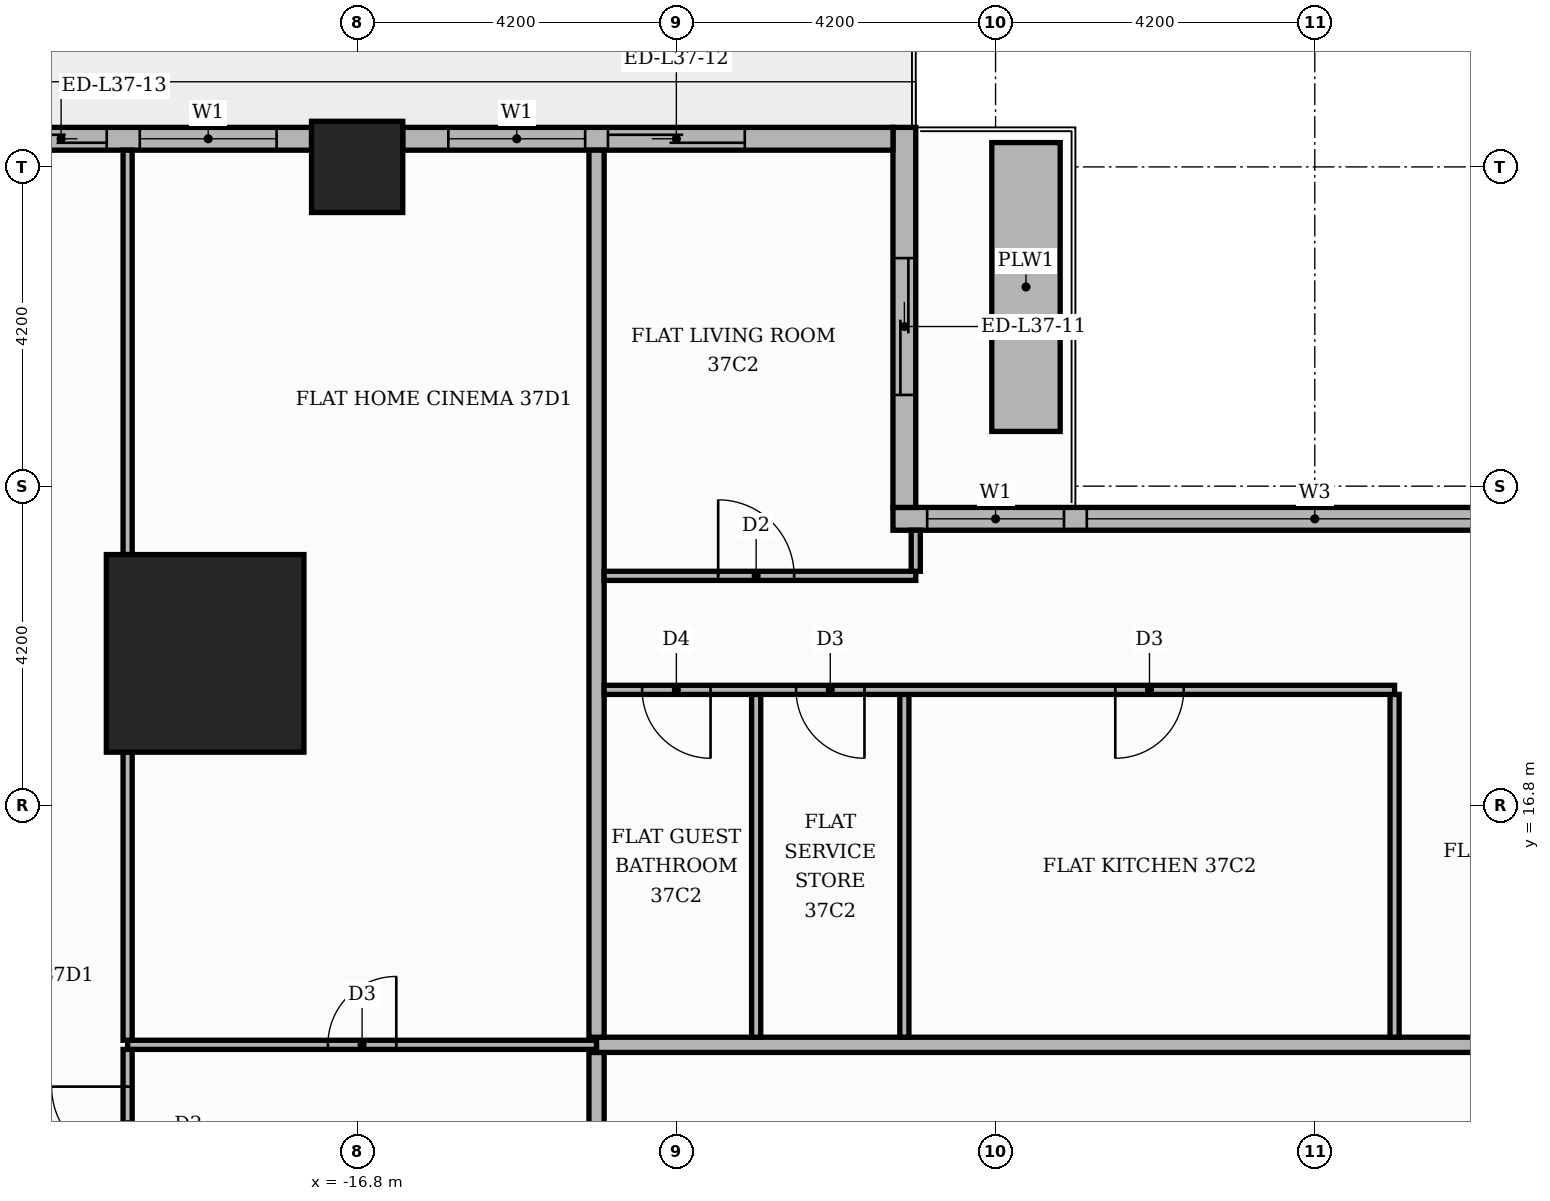
"""IFC4 building model, lengths in metres.
Left out: names, types, materials, properties, quantities, classifications, styles, units other than length and angle.
Written with IfcOpenShell. Run it as: python <this file> out.ifc"""

import sys

from ifc_helpers import new_model, si_unit, direction, frame, frame_2d, origin, origin_2d, place, context, subcontext, project, spatial, rectangle, extrude, element, fill, save


model = new_model("IFC4")
c1 = context("Model", 3, precision=1e-05, world=origin(), true_north=direction((0.0, 1.0)))
c2 = subcontext(c1, "Body", "Model", "MODEL_VIEW")
j1 = project(units=[si_unit("LENGTHUNIT", "METRE"), si_unit("PLANEANGLEUNIT", "RADIAN")], contexts=[c1])
p1 = place(None, origin())
s1 = spatial("IfcSite", under=j1, at=p1, CompositionType="ELEMENT")
p2 = place(p1, origin())
s2 = spatial("IfcBuilding", under=s1, at=p2, CompositionType="ELEMENT")
p3 = place(p2, frame((0.0, 0.0, 157.2)))
s3 = spatial("IfcBuildingStorey", under=s2, at=p3, CompositionType="ELEMENT", Elevation=157.2)
p4 = place(p3, frame((-18.8, 18.8, 0.0), z_axis=(0.0, 0.0, 1.0), x_axis=(1.0, 0.0, 0.0)))
e1 = element("IfcColumn", 1, at=p4, inside=s3, PredefinedType="COLUMN", context=c2, shape_type="SweptSolid", body=[
    extrude(rectangle(XDim=2.6, YDim=2.6, at=origin_2d()), origin(), (0.0, 0.0, 1.0), 3.9),
])
p5 = place(p3, frame((-16.8, 25.2, 0.0), z_axis=(0.0, 0.0, 1.0), x_axis=(1.0, 0.0, 0.0)))
e2 = element("IfcColumn", 2, at=p5, inside=s3, PredefinedType="COLUMN", context=c2, shape_type="SweptSolid", body=[
    extrude(rectangle(XDim=1.2, YDim=1.2, at=origin_2d()), origin(), (0.0, 0.0, 1.0), 3.9),
])
p6 = place(p3, frame((9.45, 20.57, 0.0), z_axis=(0.0, 0.0, 1.0), x_axis=(-1.0, 0.0, 0.0)))
e3 = element("IfcWall", 3, at=p6, inside=s3, PredefinedType="STANDARD", context=c2, shape_type="SweptSolid", body=[
    extrude(rectangle(XDim=19.2, YDim=0.3, at=frame_2d((9.6, 0.0))), origin(), (0.0, 0.0, 1.0), 3.48),
])
p7 = place(p6, frame((0.15, 0.0, 0.9)))
e4 = element("IfcOpeningElement", 4, at=p7, cuts=e3, PredefinedType="OPENING", context=c2, shape_type="SweptSolid", body=[
    extrude(rectangle(XDim=3.9, YDim=2.1, at=frame_2d((1.95, 1.05))), frame((0.0, 0.16, 0.0), z_axis=(0.0, -1.0, 0.0), x_axis=(1.0, 0.0, 0.0)), (0.0, 0.0, 1.0), 0.32),
])
p8 = place(p6, frame((4.35, 0.0, 0.9)))
e5 = element("IfcOpeningElement", 5, at=p8, cuts=e3, PredefinedType="OPENING", context=c2, shape_type="SweptSolid", body=[
    extrude(rectangle(XDim=6.0, YDim=2.1, at=frame_2d((3.0, 1.05))), frame((0.0, 0.16, 0.0), z_axis=(0.0, -1.0, 0.0), x_axis=(1.0, 0.0, 0.0)), (0.0, 0.0, 1.0), 0.32),
])
p9 = place(p6, frame((10.65, 0.0, 0.9)))
e6 = element("IfcOpeningElement", 6, at=p9, cuts=e3, PredefinedType="OPENING", context=c2, shape_type="SweptSolid", body=[
    extrude(rectangle(XDim=6.0, YDim=2.1, at=frame_2d((3.0, 1.05))), frame((0.0, 0.16, 0.0), z_axis=(0.0, -1.0, 0.0), x_axis=(1.0, 0.0, 0.0)), (0.0, 0.0, 1.0), 0.32),
])
p10 = place(p6, frame((16.95, 0.0, 0.9)))
e7 = element("IfcOpeningElement", 7, at=p10, cuts=e3, PredefinedType="OPENING", context=c2, shape_type="SweptSolid", body=[
    extrude(rectangle(XDim=1.8, YDim=2.1, at=frame_2d((0.9, 1.05))), frame((0.0, 0.16, 0.0), z_axis=(0.0, -1.0, 0.0), x_axis=(1.0, 0.0, 0.0)), (0.0, 0.0, 1.0), 0.32),
])
p11 = place(p3, frame((-9.6, 20.72, 0.0), z_axis=(0.0, 0.0, 1.0), x_axis=(0.0, 1.0, 0.0)))
e8 = element("IfcWall", 8, at=p11, inside=s3, PredefinedType="STANDARD", context=c2, shape_type="SweptSolid", body=[
    extrude(rectangle(XDim=5.0, YDim=0.3, at=frame_2d((2.5, 0.0))), origin(), (0.0, 0.0, 1.0), 3.48),
])
p12 = place(p11, frame((1.48, 0.0, 0.0)))
e9 = element("IfcOpeningElement", 9, at=p12, cuts=e8, PredefinedType="OPENING", context=c2, shape_type="SweptSolid", body=[
    extrude(rectangle(XDim=1.8, YDim=2.4, at=frame_2d((0.9, 1.2))), frame((0.0, 0.16, 0.0), z_axis=(0.0, -1.0, 0.0), x_axis=(1.0, 0.0, 0.0)), (0.0, 0.0, 1.0), 0.32),
])
p13 = place(p3, frame((-9.75, 25.57, 0.0), z_axis=(0.0, 0.0, 1.0), x_axis=(-1.0, 0.0, 0.0)))
e10 = element("IfcWall", 10, at=p13, inside=s3, PredefinedType="STANDARD", context=c2, shape_type="SweptSolid", body=[
    extrude(rectangle(XDim=6.45, YDim=0.3, at=frame_2d((3.225, 0.0))), origin(), (0.0, 0.0, 1.0), 3.48),
])
p14 = place(p13, frame((1.95, 0.0, 0.0)))
e11 = element("IfcOpeningElement", 11, at=p14, cuts=e10, PredefinedType="OPENING", context=c2, shape_type="SweptSolid", body=[
    extrude(rectangle(XDim=1.8, YDim=2.4, at=frame_2d((0.9, 1.2))), frame((0.0, 0.16, 0.0), z_axis=(0.0, -1.0, 0.0), x_axis=(1.0, 0.0, 0.0)), (0.0, 0.0, 1.0), 0.32),
])
p15 = place(p13, frame((4.05, 0.0, 0.9)))
e12 = element("IfcOpeningElement", 12, at=p15, cuts=e10, PredefinedType="OPENING", context=c2, shape_type="SweptSolid", body=[
    extrude(rectangle(XDim=1.8, YDim=2.1, at=frame_2d((0.9, 1.05))), frame((0.0, 0.16, 0.0), z_axis=(0.0, -1.0, 0.0), x_axis=(1.0, 0.0, 0.0)), (0.0, 0.0, 1.0), 0.32),
])
p16 = place(p3, frame((-17.4, 25.57, 0.0), z_axis=(0.0, 0.0, 1.0), x_axis=(-1.0, 0.0, 0.0)))
e13 = element("IfcWall", 13, at=p16, inside=s3, PredefinedType="STANDARD", context=c2, shape_type="SweptSolid", body=[
    extrude(rectangle(XDim=4.32, YDim=0.3, at=frame_2d((2.16, 0.0))), origin(), (0.0, 0.0, 1.0), 3.48),
])
p17 = place(p16, frame((2.695, 0.0, 0.0)))
e14 = element("IfcOpeningElement", 14, at=p17, cuts=e13, PredefinedType="OPENING", context=c2, shape_type="SweptSolid", body=[
    extrude(rectangle(XDim=1.2, YDim=2.4, at=frame_2d((0.6, 1.2))), frame((0.0, 0.16, 0.0), z_axis=(0.0, -1.0, 0.0), x_axis=(1.0, 0.0, 0.0)), (0.0, 0.0, 1.0), 0.32),
])
p18 = place(p16, frame((0.46, 0.0, 0.9)))
e15 = element("IfcOpeningElement", 15, at=p18, cuts=e13, PredefinedType="OPENING", context=c2, shape_type="SweptSolid", body=[
    extrude(rectangle(XDim=1.8, YDim=2.1, at=frame_2d((0.9, 1.05))), frame((0.0, 0.16, 0.0), z_axis=(0.0, -1.0, 0.0), x_axis=(1.0, 0.0, 0.0)), (0.0, 0.0, 1.0), 0.32),
])
p19 = place(p3, frame((-8.0, 21.72, 0.0), z_axis=(0.0, 0.0, 1.0), x_axis=(0.0, 1.0, 0.0)))
e16 = element("IfcWall", 16, at=p19, inside=s3, PredefinedType="MOVABLE", context=c2, shape_type="SweptSolid", body=[
    extrude(rectangle(XDim=3.8, YDim=0.9, at=frame_2d((1.9, 0.0))), origin(), (0.0, 0.0, 1.0), 0.6),
])
p20 = place(p3, frame((-13.65, 11.1, 0.0), z_axis=(0.0, 0.0, 1.0), x_axis=(0.0, 1.0, 0.0)))
e17 = element("IfcWall", 17, at=p20, inside=s3, PredefinedType="PARTITIONING", context=c2, shape_type="SweptSolid", body=[
    extrude(rectangle(XDim=2.45, YDim=0.2, at=frame_2d((1.225, 0.0))), origin(), (0.0, 0.0, 1.0), 3.48),
])
p21 = place(p3, frame((-19.82, 11.61, 0.0), z_axis=(0.0, 0.0, 1.0), x_axis=(0.0, 1.0, 0.0)))
e18 = element("IfcWall", 18, at=p21, inside=s3, PredefinedType="PARTITIONING", context=c2, shape_type="SweptSolid", body=[
    extrude(rectangle(XDim=1.98, YDim=0.12, at=frame_2d((0.99, 0.0))), origin(), (0.0, 0.0, 1.0), 3.48),
])
p22 = place(p21, frame((0.49, 0.0, 0.0)))
e19 = element("IfcOpeningElement", 19, at=p22, cuts=e18, PredefinedType="OPENING", context=c2, shape_type="SweptSolid", body=[
    extrude(rectangle(XDim=1.0, YDim=2.1, at=frame_2d((0.5, 1.05))), frame((0.0, 0.07, 0.0), z_axis=(0.0, -1.0, 0.0), x_axis=(1.0, 0.0, 0.0)), (0.0, 0.0, 1.0), 0.14),
])
p23 = place(p3, frame((-19.82, 13.65, 0.0), z_axis=(0.0, 0.0, 1.0), x_axis=(1.0, 0.0, 0.0)))
e20 = element("IfcWall", 20, at=p23, inside=s3, PredefinedType="PARTITIONING", context=c2, shape_type="SweptSolid", body=[
    extrude(rectangle(XDim=6.17, YDim=0.12, at=frame_2d((3.085, 0.0))), origin(), (0.0, 0.0, 1.0), 3.48),
])
p24 = place(p23, frame((2.635, 0.0, 0.0)))
e21 = element("IfcOpeningElement", 21, at=p24, cuts=e20, PredefinedType="OPENING", context=c2, shape_type="SweptSolid", body=[
    extrude(rectangle(XDim=0.9, YDim=2.1, at=frame_2d((0.45, 1.05))), frame((0.0, 0.07, 0.0), z_axis=(0.0, -1.0, 0.0), x_axis=(1.0, 0.0, 0.0)), (0.0, 0.0, 1.0), 0.14),
])
p25 = place(p3, frame((-13.65, 13.65, 0.0), z_axis=(0.0, 0.0, 1.0), x_axis=(1.0, 0.0, 0.0)))
e22 = element("IfcWall", 22, at=p25, inside=s3, PredefinedType="PARTITIONING", context=c2, shape_type="SweptSolid", body=[
    extrude(rectangle(XDim=39.07, YDim=0.2, at=frame_2d((19.535, 0.0))), origin(), (0.0, 0.0, 1.0), 3.48),
])
p26 = place(p25, frame((24.65, 0.0, 0.0)))
e23 = element("IfcOpeningElement", 23, at=p26, cuts=e22, PredefinedType="OPENING", context=c2, shape_type="SweptSolid", body=[
    extrude(rectangle(XDim=1.1, YDim=2.4, at=frame_2d((0.55, 1.2))), frame((0.0, 0.11, 0.0), z_axis=(0.0, -1.0, 0.0), x_axis=(1.0, 0.0, 0.0)), (0.0, 0.0, 1.0), 0.22),
])
p27 = place(p25, frame((12.05, 0.0, 0.0)))
e24 = element("IfcOpeningElement", 24, at=p27, cuts=e22, PredefinedType="OPENING", context=c2, shape_type="SweptSolid", body=[
    extrude(rectangle(XDim=1.1, YDim=2.4, at=frame_2d((0.55, 1.2))), frame((0.0, 0.11, 0.0), z_axis=(0.0, -1.0, 0.0), x_axis=(1.0, 0.0, 0.0)), (0.0, 0.0, 1.0), 0.22),
])
p28 = place(p3, frame((-19.82, 13.71, 0.0), z_axis=(0.0, 0.0, 1.0), x_axis=(0.0, 1.0, 0.0)))
e25 = element("IfcWall", 25, at=p28, inside=s3, PredefinedType="PARTITIONING", context=c2, shape_type="SweptSolid", body=[
    extrude(rectangle(XDim=3.79, YDim=0.12, at=frame_2d((1.895, 0.0))), origin(), (0.0, 0.0, 1.0), 3.48),
])
p29 = place(p3, frame((-13.65, 13.75, 0.0), z_axis=(0.0, 0.0, 1.0), x_axis=(0.0, 1.0, 0.0)))
e26 = element("IfcWall", 26, at=p29, inside=s3, PredefinedType="PARTITIONING", context=c2, shape_type="SweptSolid", body=[
    extrude(rectangle(XDim=11.67, YDim=0.2, at=frame_2d((5.835, 0.0))), origin(), (0.0, 0.0, 1.0), 3.48),
])
for number, where, z_axis, x_axis in (
    (27, (-11.55, 13.75, 0.0), (0.0, 0.0, 1.0), (0.0, 1.0, 0.0)),
    (28, (-9.6, 13.75, 0.0), (0.0, 0.0, 1.0), (0.0, 1.0, 0.0)),
    (29, (-3.15, 13.75, 0.0), (0.0, 0.0, 1.0), (0.0, 1.0, 0.0)),
):
    element("IfcWall", number, at=place(p3, frame(where, z_axis=z_axis, x_axis=x_axis)), inside=s3, PredefinedType="PARTITIONING", context=c2, shape_type="SweptSolid", body=[
        extrude(rectangle(XDim=4.51, YDim=0.12, at=frame_2d((2.255, 0.0))), origin(), (0.0, 0.0, 1.0), 3.48),
    ])
p30 = place(p3, frame((-13.55, 18.32, 0.0), z_axis=(0.0, 0.0, 1.0), x_axis=(1.0, 0.0, 0.0)))
e30 = element("IfcWall", 30, at=p30, inside=s3, PredefinedType="PARTITIONING", context=c2, shape_type="SweptSolid", body=[
    extrude(rectangle(XDim=10.4, YDim=0.12, at=frame_2d((5.2, 0.0))), origin(), (0.0, 0.0, 1.0), 3.48),
])
p31 = place(p30, frame((6.725, 0.0, 0.0)))
e31 = element("IfcOpeningElement", 31, at=p31, cuts=e30, PredefinedType="OPENING", context=c2, shape_type="SweptSolid", body=[
    extrude(rectangle(XDim=0.9, YDim=2.1, at=frame_2d((0.45, 1.05))), frame((0.0, 0.07, 0.0), z_axis=(0.0, -1.0, 0.0), x_axis=(1.0, 0.0, 0.0)), (0.0, 0.0, 1.0), 0.14),
])
p32 = place(p30, frame((2.525, 0.0, 0.0)))
e32 = element("IfcOpeningElement", 32, at=p32, cuts=e30, PredefinedType="OPENING", context=c2, shape_type="SweptSolid", body=[
    extrude(rectangle(XDim=0.9, YDim=2.1, at=frame_2d((0.45, 1.05))), frame((0.0, 0.07, 0.0), z_axis=(0.0, -1.0, 0.0), x_axis=(1.0, 0.0, 0.0)), (0.0, 0.0, 1.0), 0.14),
])
p33 = place(p30, frame((0.5, 0.0, 0.0)))
e33 = element("IfcOpeningElement", 33, at=p33, cuts=e30, PredefinedType="OPENING", context=c2, shape_type="SweptSolid", body=[
    extrude(rectangle(XDim=0.9, YDim=2.1, at=frame_2d((0.45, 1.05))), frame((0.0, 0.07, 0.0), z_axis=(0.0, -1.0, 0.0), x_axis=(1.0, 0.0, 0.0)), (0.0, 0.0, 1.0), 0.14),
])
p34 = place(p3, frame((-13.55, 19.82, 0.0), z_axis=(0.0, 0.0, 1.0), x_axis=(1.0, 0.0, 0.0)))
e34 = element("IfcWall", 34, at=p34, inside=s3, PredefinedType="PARTITIONING", context=c2, shape_type="SweptSolid", body=[
    extrude(rectangle(XDim=4.1, YDim=0.12, at=frame_2d((2.05, 0.0))), origin(), (0.0, 0.0, 1.0), 3.48),
])
p35 = place(p34, frame((1.5, 0.0, 0.0)))
e35 = element("IfcOpeningElement", 35, at=p35, cuts=e34, PredefinedType="OPENING", context=c2, shape_type="SweptSolid", body=[
    extrude(rectangle(XDim=1.0, YDim=2.1, at=frame_2d((0.5, 1.05))), frame((0.0, 0.07, 0.0), z_axis=(0.0, -1.0, 0.0), x_axis=(1.0, 0.0, 0.0)), (0.0, 0.0, 1.0), 0.14),
])
p36 = place(p3, frame((-9.45, 19.88, 0.0), z_axis=(0.0, 0.0, 1.0), x_axis=(0.0, 1.0, 0.0)))
e36 = element("IfcWall", 36, at=p36, inside=s3, PredefinedType="PARTITIONING", context=c2, shape_type="SweptSolid", body=[
    extrude(rectangle(XDim=0.54, YDim=0.12, at=frame_2d((0.27, 0.0))), origin(), (0.0, 0.0, 1.0), 3.48),
])
p37 = place(p3, frame((-19.82, 20.1, 0.0), z_axis=(0.0, 0.0, 1.0), x_axis=(0.0, 1.0, 0.0)))
e37 = element("IfcWall", 37, at=p37, inside=s3, PredefinedType="PARTITIONING", context=c2, shape_type="SweptSolid", body=[
    extrude(rectangle(XDim=5.32, YDim=0.12, at=frame_2d((2.66, 0.0))), origin(), (0.0, 0.0, 1.0), 3.48),
])
p38 = place(p9, origin())
e38 = element("IfcWindow", 38, at=p38, inside=s3, PartitioningType="SINGLE_PANEL", PredefinedType="WINDOW", context=c2, shape_type="SweptSolid", body=[
    extrude(rectangle(XDim=6.0, YDim=2.1, at=frame_2d((3.0, 1.05))), frame((0.0, 0.03, 0.0), z_axis=(0.0, -1.0, 0.0), x_axis=(1.0, 0.0, 0.0)), (0.0, 0.0, 1.0), 0.06),
])
fill(e6, e38)
p39 = place(p10, origin())
e39 = element("IfcWindow", 39, at=p39, inside=s3, PartitioningType="SINGLE_PANEL", PredefinedType="WINDOW", context=c2, shape_type="SweptSolid", body=[
    extrude(rectangle(XDim=1.8, YDim=2.1, at=frame_2d((0.9, 1.05))), frame((0.0, 0.03, 0.0), z_axis=(0.0, -1.0, 0.0), x_axis=(1.0, 0.0, 0.0)), (0.0, 0.0, 1.0), 0.06),
])
fill(e7, e39)
p40 = place(p12, origin())
e40 = element("IfcDoor", 40, at=p40, inside=s3, OperationType="SLIDING_TO_RIGHT", PredefinedType="DOOR", context=c2, shape_type="SweptSolid", body=[
    extrude(rectangle(XDim=1.8, YDim=2.4, at=frame_2d((0.9, 1.2))), frame((0.0, 0.025, 0.0), z_axis=(0.0, -1.0, 0.0), x_axis=(1.0, 0.0, 0.0)), (0.0, 0.0, 1.0), 0.05),
])
fill(e9, e40)
p41 = place(p14, origin())
e41 = element("IfcDoor", 41, at=p41, inside=s3, OperationType="SLIDING_TO_RIGHT", PredefinedType="DOOR", context=c2, shape_type="SweptSolid", body=[
    extrude(rectangle(XDim=1.8, YDim=2.4, at=frame_2d((0.9, 1.2))), frame((0.0, 0.025, 0.0), z_axis=(0.0, -1.0, 0.0), x_axis=(1.0, 0.0, 0.0)), (0.0, 0.0, 1.0), 0.05),
])
fill(e11, e41)
p42 = place(p15, origin())
e42 = element("IfcWindow", 42, at=p42, inside=s3, PartitioningType="SINGLE_PANEL", PredefinedType="WINDOW", context=c2, shape_type="SweptSolid", body=[
    extrude(rectangle(XDim=1.8, YDim=2.1, at=frame_2d((0.9, 1.05))), frame((0.0, 0.03, 0.0), z_axis=(0.0, -1.0, 0.0), x_axis=(1.0, 0.0, 0.0)), (0.0, 0.0, 1.0), 0.06),
])
fill(e12, e42)
p43 = place(p17, origin())
e43 = element("IfcDoor", 43, at=p43, inside=s3, OperationType="SLIDING_TO_LEFT", PredefinedType="DOOR", context=c2, shape_type="SweptSolid", body=[
    extrude(rectangle(XDim=1.2, YDim=2.4, at=frame_2d((0.6, 1.2))), frame((0.0, 0.025, 0.0), z_axis=(0.0, -1.0, 0.0), x_axis=(1.0, 0.0, 0.0)), (0.0, 0.0, 1.0), 0.05),
])
fill(e14, e43)
p44 = place(p18, origin())
e44 = element("IfcWindow", 44, at=p44, inside=s3, PartitioningType="SINGLE_PANEL", PredefinedType="WINDOW", context=c2, shape_type="SweptSolid", body=[
    extrude(rectangle(XDim=1.8, YDim=2.1, at=frame_2d((0.9, 1.05))), frame((0.0, 0.03, 0.0), z_axis=(0.0, -1.0, 0.0), x_axis=(1.0, 0.0, 0.0)), (0.0, 0.0, 1.0), 0.06),
])
fill(e15, e44)
p45 = place(p31, frame((0.9, 0.0, 0.0), z_axis=(0.0, 0.0, 1.0), x_axis=(-1.0, 0.0, 0.0)))
e45 = element("IfcDoor", 45, at=p45, inside=s3, OperationType="SINGLE_SWING_LEFT", PredefinedType="DOOR", context=c2, shape_type="SweptSolid", body=[
    extrude(rectangle(XDim=0.9, YDim=2.1, at=frame_2d((0.45, 1.05))), frame((0.0, 0.025, 0.0), z_axis=(0.0, -1.0, 0.0), x_axis=(1.0, 0.0, 0.0)), (0.0, 0.0, 1.0), 0.05),
])
fill(e31, e45)
p46 = place(p32, frame((0.9, 0.0, 0.0), z_axis=(0.0, 0.0, 1.0), x_axis=(-1.0, 0.0, 0.0)))
e46 = element("IfcDoor", 46, at=p46, inside=s3, OperationType="SINGLE_SWING_RIGHT", PredefinedType="DOOR", context=c2, shape_type="SweptSolid", body=[
    extrude(rectangle(XDim=0.9, YDim=2.1, at=frame_2d((0.45, 1.05))), frame((0.0, 0.025, 0.0), z_axis=(0.0, -1.0, 0.0), x_axis=(1.0, 0.0, 0.0)), (0.0, 0.0, 1.0), 0.05),
])
fill(e32, e46)
p47 = place(p33, frame((0.9, 0.0, 0.0), z_axis=(0.0, 0.0, 1.0), x_axis=(-1.0, 0.0, 0.0)))
e47 = element("IfcDoor", 47, at=p47, inside=s3, OperationType="SINGLE_SWING_RIGHT", PredefinedType="DOOR", context=c2, shape_type="SweptSolid", body=[
    extrude(rectangle(XDim=0.9, YDim=2.1, at=frame_2d((0.45, 1.05))), frame((0.0, 0.025, 0.0), z_axis=(0.0, -1.0, 0.0), x_axis=(1.0, 0.0, 0.0)), (0.0, 0.0, 1.0), 0.05),
])
fill(e33, e47)
p48 = place(p35, origin())
e48 = element("IfcDoor", 48, at=p48, inside=s3, OperationType="SINGLE_SWING_LEFT", PredefinedType="DOOR", context=c2, shape_type="SweptSolid", body=[
    extrude(rectangle(XDim=1.0, YDim=2.1, at=frame_2d((0.5, 1.05))), frame((0.0, 0.025, 0.0), z_axis=(0.0, -1.0, 0.0), x_axis=(1.0, 0.0, 0.0)), (0.0, 0.0, 1.0), 0.05),
])
fill(e35, e48)
p49 = place(p24, origin())
e49 = element("IfcDoor", 49, at=p49, inside=s3, OperationType="SINGLE_SWING_RIGHT", PredefinedType="DOOR", context=c2, shape_type="SweptSolid", body=[
    extrude(rectangle(XDim=0.9, YDim=2.1, at=frame_2d((0.45, 1.05))), frame((0.0, 0.025, 0.0), z_axis=(0.0, -1.0, 0.0), x_axis=(1.0, 0.0, 0.0)), (0.0, 0.0, 1.0), 0.05),
])
fill(e21, e49)
p50 = place(p22, origin())
e50 = element("IfcDoor", 50, at=p50, inside=s3, OperationType="SINGLE_SWING_RIGHT", PredefinedType="DOOR", context=c2, shape_type="SweptSolid", body=[
    extrude(rectangle(XDim=1.0, YDim=2.1, at=frame_2d((0.5, 1.05))), frame((0.0, 0.025, 0.0), z_axis=(0.0, -1.0, 0.0), x_axis=(1.0, 0.0, 0.0)), (0.0, 0.0, 1.0), 0.05),
])
fill(e19, e50)
save(model, sys.argv[1])
